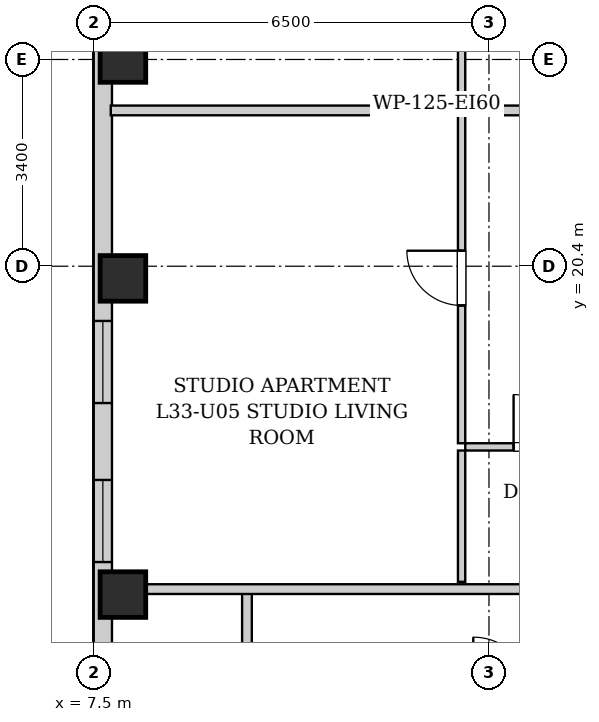
"""IFC4 building model, lengths in metres.
Left out: names, types, materials, properties, quantities, classifications, styles, units other than length and angle.
Written with IfcOpenShell. Run it as: python <this file> out.ifc"""

import sys

from ifc_helpers import new_model, si_unit, direction, frame, frame_2d, origin, origin_2d, place, context, subcontext, project, spatial, rectangle, extrude, element, fill, save


model = new_model("IFC4")
c1 = context("Model", 3, precision=1e-05, world=origin(), true_north=direction((0.0, 1.0)))
c2 = subcontext(c1, "Body", "Model", "MODEL_VIEW")
j1 = project(units=[si_unit("LENGTHUNIT", "METRE"), si_unit("PLANEANGLEUNIT", "RADIAN")], contexts=[c1])
p1 = place(None, origin())
s1 = spatial("IfcSite", under=j1, at=p1, CompositionType="ELEMENT")
p2 = place(p1, origin())
s2 = spatial("IfcBuilding", under=s1, at=p2, CompositionType="ELEMENT")
p3 = place(p2, frame((0.0, 0.0, 116.7)))
s3 = spatial("IfcBuildingStorey", under=s2, at=p3, CompositionType="ELEMENT", Elevation=116.7)
for number, where, z_axis, x_axis in (
    (1, (7.98, 15.0, 0.0), (0.0, 0.0, 1.0), (1.0, 0.0, 0.0)),
    (2, (7.98, 20.2, 0.0), (0.0, 0.0, 1.0), (1.0, 0.0, 0.0)),
    (3, (7.98, 23.8, 0.0), (0.0, 0.0, 1.0), (1.0, 0.0, 0.0)),
):
    element("IfcColumn", number, at=place(p3, frame(where, z_axis=z_axis, x_axis=x_axis)), inside=s3, PredefinedType="COLUMN", context=c2, shape_type="SweptSolid", body=[
        extrude(rectangle(XDim=0.75, YDim=0.75, at=origin_2d()), origin(), (0.0, 0.0, 1.0), 3.2),
    ])
p4 = place(p3, frame((7.65, 2.5, 0.0), z_axis=(0.0, 0.0, 1.0), x_axis=(0.0, 1.0, 0.0)))
e4 = element("IfcWall", 4, at=p4, inside=s3, PredefinedType="SOLIDWALL", context=c2, shape_type="SweptSolid", body=[
    extrude(rectangle(XDim=38.3, YDim=0.3, at=frame_2d((19.15, 0.0))), origin(), (0.0, 0.0, 1.0), 2.88),
])
p5 = place(p4, frame((3.38, 0.0, 0.55)))
e5 = element("IfcOpeningElement", 5, at=p5, cuts=e4, PredefinedType="OPENING", context=c2, shape_type="SweptSolid", body=[
    extrude(rectangle(XDim=1.35, YDim=1.2, at=frame_2d((0.675, 0.6))), frame((0.0, 0.16, 0.0), z_axis=(0.0, -1.0, 0.0), x_axis=(1.0, 0.0, 0.0)), (0.0, 0.0, 1.0), 0.32),
])
p6 = place(p4, frame((1.135, 0.0, 0.55)))
e6 = element("IfcOpeningElement", 6, at=p6, cuts=e4, PredefinedType="OPENING", context=c2, shape_type="SweptSolid", body=[
    extrude(rectangle(XDim=1.35, YDim=1.2, at=frame_2d((0.675, 0.6))), frame((0.0, 0.16, 0.0), z_axis=(0.0, -1.0, 0.0), x_axis=(1.0, 0.0, 0.0)), (0.0, 0.0, 1.0), 0.32),
])
p7 = place(p4, frame((33.946, 0.0, 0.55)))
e7 = element("IfcOpeningElement", 7, at=p7, cuts=e4, PredefinedType="OPENING", context=c2, shape_type="SweptSolid", body=[
    extrude(rectangle(XDim=1.35, YDim=1.2, at=frame_2d((0.675, 0.6))), frame((0.0, 0.16, 0.0), z_axis=(0.0, -1.0, 0.0), x_axis=(1.0, 0.0, 0.0)), (0.0, 0.0, 1.0), 0.32),
])
p8 = place(p4, frame((32.035, 0.0, 0.55)))
e8 = element("IfcOpeningElement", 8, at=p8, cuts=e4, PredefinedType="OPENING", context=c2, shape_type="SweptSolid", body=[
    extrude(rectangle(XDim=1.35, YDim=1.2, at=frame_2d((0.675, 0.6))), frame((0.0, 0.16, 0.0), z_axis=(0.0, -1.0, 0.0), x_axis=(1.0, 0.0, 0.0)), (0.0, 0.0, 1.0), 0.32),
])
p9 = place(p4, frame((15.65, 0.0, 0.55)))
e9 = element("IfcOpeningElement", 9, at=p9, cuts=e4, PredefinedType="OPENING", context=c2, shape_type="SweptSolid", body=[
    extrude(rectangle(XDim=1.35, YDim=1.2, at=frame_2d((0.675, 0.6))), frame((0.0, 0.16, 0.0), z_axis=(0.0, -1.0, 0.0), x_axis=(1.0, 0.0, 0.0)), (0.0, 0.0, 1.0), 0.32),
])
p10 = place(p4, frame((13.035, 0.0, 0.55)))
e10 = element("IfcOpeningElement", 10, at=p10, cuts=e4, PredefinedType="OPENING", context=c2, shape_type="SweptSolid", body=[
    extrude(rectangle(XDim=1.35, YDim=1.2, at=frame_2d((0.675, 0.6))), frame((0.0, 0.16, 0.0), z_axis=(0.0, -1.0, 0.0), x_axis=(1.0, 0.0, 0.0)), (0.0, 0.0, 1.0), 0.32),
])
p11 = place(p4, frame((22.831, 0.0, 0.55)))
e11 = element("IfcOpeningElement", 11, at=p11, cuts=e4, PredefinedType="OPENING", context=c2, shape_type="SweptSolid", body=[
    extrude(rectangle(XDim=1.35, YDim=1.2, at=frame_2d((0.675, 0.6))), frame((0.0, 0.16, 0.0), z_axis=(0.0, -1.0, 0.0), x_axis=(1.0, 0.0, 0.0)), (0.0, 0.0, 1.0), 0.32),
])
p12 = place(p4, frame((24.441, 0.0, 0.55)))
e12 = element("IfcOpeningElement", 12, at=p12, cuts=e4, PredefinedType="OPENING", context=c2, shape_type="SweptSolid", body=[
    extrude(rectangle(XDim=1.35, YDim=1.2, at=frame_2d((0.675, 0.6))), frame((0.0, 0.16, 0.0), z_axis=(0.0, -1.0, 0.0), x_axis=(1.0, 0.0, 0.0)), (0.0, 0.0, 1.0), 0.32),
])
p13 = place(p3, frame((10.02, 13.35, 0.0), z_axis=(0.0, 0.0, 1.0), x_axis=(0.0, 1.0, 0.0)))
e13 = element("IfcWall", 13, at=p13, inside=s3, PredefinedType="PARTITIONING", context=c2, shape_type="SweptSolid", body=[
    extrude(rectangle(XDim=1.74, YDim=0.16, at=frame_2d((0.87, 0.0))), origin(), (0.0, 0.0, 1.0), 2.88),
])
p14 = place(p3, frame((7.78, 15.09, 0.0), z_axis=(0.0, 0.0, 1.0), x_axis=(1.0, 0.0, 0.0)))
e14 = element("IfcWall", 14, at=p14, inside=s3, PredefinedType="PARTITIONING", context=c2, shape_type="SweptSolid", body=[
    extrude(rectangle(XDim=8.36, YDim=0.16, at=frame_2d((4.18, 0.0))), origin(), (0.0, 0.0, 1.0), 2.253),
])
p15 = place(p3, frame((7.78, 22.962, 0.0), z_axis=(0.0, 0.0, 1.0), x_axis=(1.0, 0.0, 0.0)))
e15 = element("IfcWall", 15, at=p15, inside=s3, PredefinedType="PARTITIONING", context=c2, shape_type="SweptSolid", body=[
    extrude(rectangle(XDim=8.28, YDim=0.16, at=frame_2d((4.14, 0.0))), origin(), (0.0, 0.0, 1.0), 2.88),
])
p16 = place(p3, frame((13.61, 17.429, 0.0), z_axis=(0.0, 0.0, 1.0), x_axis=(1.0, 0.0, 0.0)))
e16 = element("IfcWall", 16, at=p16, inside=s3, PredefinedType="PARTITIONING", context=c2, shape_type="SweptSolid", body=[
    extrude(rectangle(XDim=2.45, YDim=0.12, at=frame_2d((1.225, 0.0))), origin(), (0.0, 0.0, 1.0), 2.88),
])
p17 = place(p16, frame((0.795, 0.0, 0.0)))
e17 = element("IfcOpeningElement", 17, at=p17, cuts=e16, PredefinedType="OPENING", context=c2, shape_type="SweptSolid", body=[
    extrude(rectangle(XDim=0.86, YDim=2.05, at=frame_2d((0.43, 1.025))), frame((0.0, 0.07, 0.0), z_axis=(0.0, -1.0, 0.0), x_axis=(1.0, 0.0, 0.0)), (0.0, 0.0, 1.0), 0.14),
])
p18 = place(p3, frame((13.55, 15.21, 0.0), z_axis=(0.0, 0.0, 1.0), x_axis=(0.0, 1.0, 0.0)))
e18 = element("IfcWall", 18, at=p18, inside=s3, PredefinedType="PARTITIONING", context=c2, shape_type="SweptSolid", body=[
    extrude(rectangle(XDim=2.159, YDim=0.12, at=frame_2d((1.08, 0.0))), origin(), (0.0, 0.0, 1.0), 2.88),
])
p19 = place(p3, frame((13.55, 17.489, 0.0), z_axis=(0.0, 0.0, 1.0), x_axis=(0.0, 1.0, 0.0)))
e19 = element("IfcWall", 19, at=p19, inside=s3, PredefinedType="PARTITIONING", context=c2, shape_type="SweptSolid", body=[
    extrude(rectangle(XDim=5.433, YDim=0.12, at=frame_2d((2.717, 0.0))), origin(), (0.0, 0.0, 1.0), 2.88),
])
p20 = place(p19, frame((2.266, 0.0, 0.0)))
e20 = element("IfcOpeningElement", 20, at=p20, cuts=e19, PredefinedType="OPENING", context=c2, shape_type="SweptSolid", body=[
    extrude(rectangle(XDim=0.9, YDim=2.05, at=frame_2d((0.45, 1.025))), frame((0.0, 0.07, 0.0), z_axis=(0.0, -1.0, 0.0), x_axis=(1.0, 0.0, 0.0)), (0.0, 0.0, 1.0), 0.14),
])
p21 = place(p3, frame((13.55, 23.082, 0.0), z_axis=(0.0, 0.0, 1.0), x_axis=(0.0, 1.0, 0.0)))
e21 = element("IfcWall", 21, at=p21, inside=s3, PredefinedType="PARTITIONING", context=c2, shape_type="SweptSolid", body=[
    extrude(rectangle(XDim=1.85, YDim=0.12, at=frame_2d((0.925, 0.0))), origin(), (0.0, 0.0, 1.0), 2.88),
])
p22 = place(p17, origin())
e22 = element("IfcDoor", 22, at=p22, inside=s3, OperationType="SINGLE_SWING_LEFT", PredefinedType="DOOR", context=c2, shape_type="SweptSolid", body=[
    extrude(rectangle(XDim=0.86, YDim=2.05, at=frame_2d((0.43, 1.025))), frame((0.0, 0.025, 0.0), z_axis=(0.0, -1.0, 0.0), x_axis=(1.0, 0.0, 0.0)), (0.0, 0.0, 1.0), 0.05),
])
fill(e17, e22)
p23 = place(p20, origin())
e23 = element("IfcDoor", 23, at=p23, inside=s3, OperationType="SINGLE_SWING_RIGHT", PredefinedType="DOOR", context=c2, shape_type="SweptSolid", body=[
    extrude(rectangle(XDim=0.9, YDim=2.05, at=frame_2d((0.45, 1.025))), frame((0.0, 0.025, 0.0), z_axis=(0.0, -1.0, 0.0), x_axis=(1.0, 0.0, 0.0)), (0.0, 0.0, 1.0), 0.05),
])
fill(e20, e23)
p24 = place(p9, origin())
e24 = element("IfcWindow", 24, at=p24, inside=s3, PartitioningType="SINGLE_PANEL", PredefinedType="WINDOW", context=c2, shape_type="SweptSolid", body=[
    extrude(rectangle(XDim=1.35, YDim=1.2, at=frame_2d((0.675, 0.6))), frame((0.0, 0.03, 0.0), z_axis=(0.0, -1.0, 0.0), x_axis=(1.0, 0.0, 0.0)), (0.0, 0.0, 1.0), 0.06),
])
fill(e9, e24)
p25 = place(p10, origin())
e25 = element("IfcWindow", 25, at=p25, inside=s3, PartitioningType="SINGLE_PANEL", PredefinedType="WINDOW", context=c2, shape_type="SweptSolid", body=[
    extrude(rectangle(XDim=1.35, YDim=1.2, at=frame_2d((0.675, 0.6))), frame((0.0, 0.03, 0.0), z_axis=(0.0, -1.0, 0.0), x_axis=(1.0, 0.0, 0.0)), (0.0, 0.0, 1.0), 0.06),
])
fill(e10, e25)
save(model, sys.argv[1])
